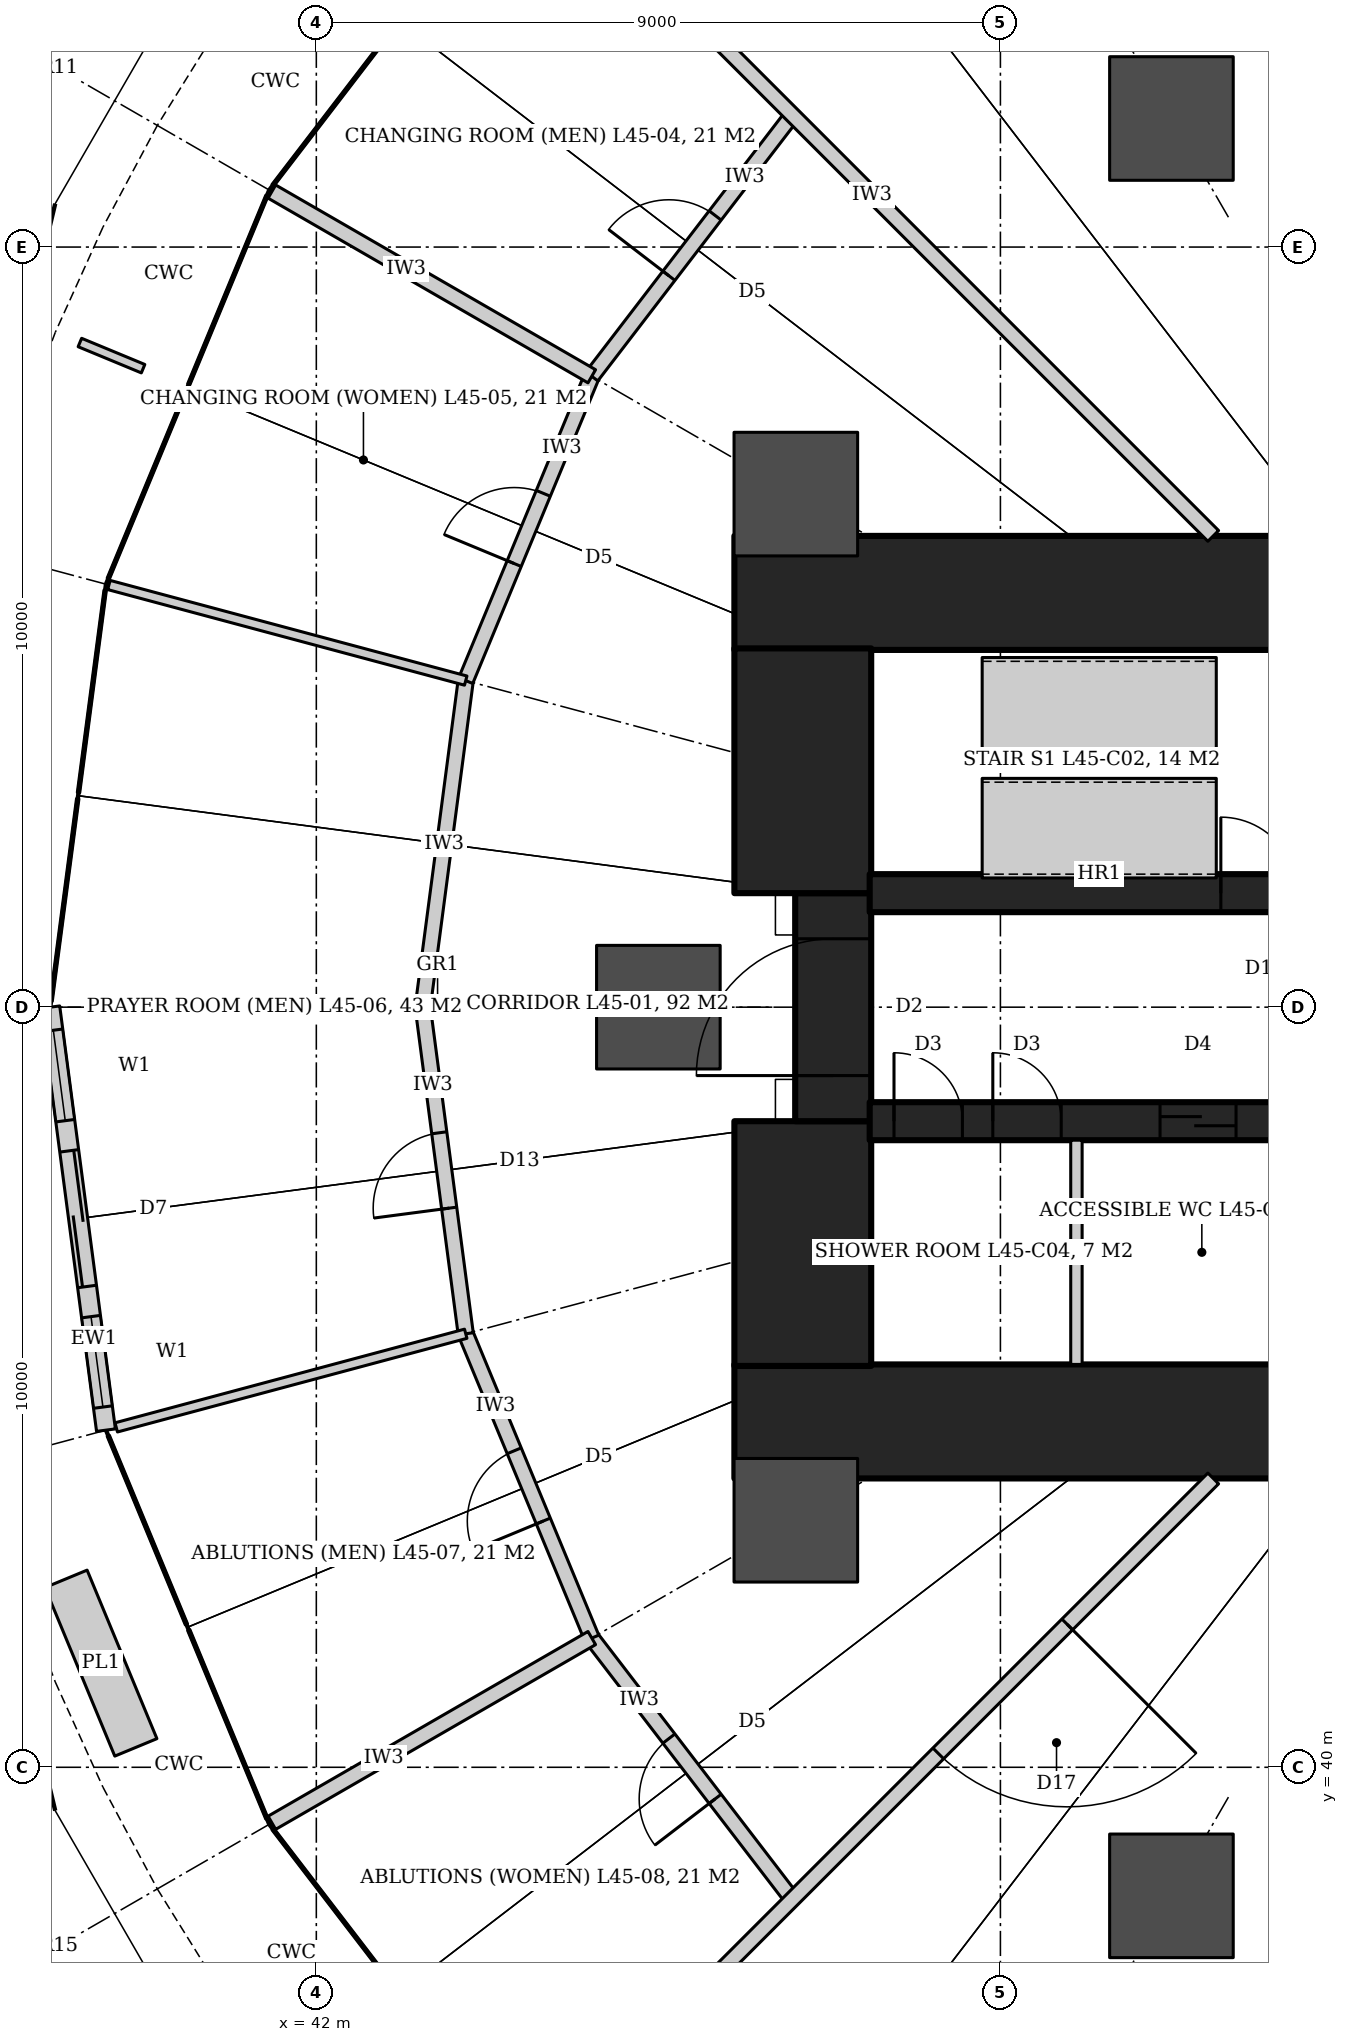
"""IFC4 building model, lengths in metres.
Left out: names, types, materials, properties, quantities, classifications, styles, units other than length and angle.
Written with IfcOpenShell. Run it as: python <this file> out.ifc"""

import sys

from ifc_helpers import new_model, si_unit, direction, frame, frame_2d, origin, origin_2d, place, context, subcontext, project, spatial, rectangle, hollow_circle, extrude, element, fill, save


model = new_model("IFC4")
c1 = context("Model", 3, precision=1e-05, world=origin(), true_north=direction((0.0, 1.0)))
c2 = subcontext(c1, "Body", "Model", "MODEL_VIEW")
j1 = project(units=[si_unit("LENGTHUNIT", "METRE"), si_unit("PLANEANGLEUNIT", "RADIAN")], contexts=[c1])
p1 = place(None, origin())
s1 = spatial("IfcSite", under=j1, at=p1, CompositionType="ELEMENT")
p2 = place(p1, origin())
s2 = spatial("IfcBuilding", under=s1, at=p2, CompositionType="ELEMENT")
p3 = place(p2, frame((0.0, 0.0, 198.2)))
s3 = spatial("IfcBuildingStorey", under=s2, at=p3, CompositionType="ELEMENT", Elevation=198.2)
for number, where, z_axis, x_axis in (
    (1, (47.5, 55.45, 0.0), (0.0, 0.0, 1.0), (1.0, 0.0, 0.0)),
    (2, (47.5, 44.55, 0.0), (0.0, 0.0, 1.0), (1.0, 0.0, 0.0)),
):
    element("IfcWall", number, at=place(p3, frame(where, z_axis=z_axis, x_axis=x_axis)), inside=s3, PredefinedType="SHEAR", context=c2, shape_type="SweptSolid", body=[
        extrude(rectangle(XDim=7.9, YDim=1.5, at=frame_2d((3.95, 0.0))), origin(), (0.0, 0.0, 1.0), 4.2),
    ])
p4 = place(p3, frame((48.4, 45.28, 0.0), z_axis=(0.0, 0.0, 1.0), x_axis=(0.0, 1.0, 0.0)))
e3 = element("IfcWall", 3, at=p4, inside=s3, PredefinedType="SHEAR", context=c2, shape_type="SweptSolid", body=[
    extrude(rectangle(XDim=3.22, YDim=1.8, at=frame_2d((1.61, 0.0))), origin(), (0.0, 0.0, 1.0), 4.2),
])
p5 = place(p3, frame((48.8, 48.5, 0.0), z_axis=(0.0, 0.0, 1.0), x_axis=(0.0, 1.0, 0.0)))
e4 = element("IfcWall", 4, at=p5, inside=s3, PredefinedType="SHEAR", context=c2, shape_type="SweptSolid", body=[
    extrude(rectangle(XDim=3.0, YDim=1.0, at=frame_2d((1.5, 0.0))), origin(), (0.0, 0.0, 1.0), 4.2),
])
p6 = place(p5, frame((0.6, 0.0, 0.0)))
e5 = element("IfcOpeningElement", 5, at=p6, cuts=e4, PredefinedType="OPENING", context=c2, shape_type="SweptSolid", body=[
    extrude(rectangle(XDim=1.8, YDim=2.1, at=frame_2d((0.9, 1.05))), frame((0.0, 0.51, 0.0), z_axis=(0.0, -1.0, 0.0), x_axis=(1.0, 0.0, 0.0)), (0.0, 0.0, 1.0), 1.02),
])
p7 = place(p3, frame((48.4, 51.5, 0.0), z_axis=(0.0, 0.0, 1.0), x_axis=(0.0, 1.0, 0.0)))
e6 = element("IfcWall", 6, at=p7, inside=s3, PredefinedType="SHEAR", context=c2, shape_type="SweptSolid", body=[
    extrude(rectangle(XDim=3.22, YDim=1.8, at=frame_2d((1.61, 0.0))), origin(), (0.0, 0.0, 1.0), 4.2),
])
p8 = place(p3, frame((49.28, 51.5, 0.0), z_axis=(0.0, 0.0, 1.0), x_axis=(1.0, 0.0, 0.0)))
e7 = element("IfcWall", 7, at=p8, inside=s3, PredefinedType="SHEAR", context=c2, shape_type="SweptSolid", body=[
    extrude(rectangle(XDim=6.12, YDim=0.5, at=frame_2d((3.06, 0.0))), origin(), (0.0, 0.0, 1.0), 4.2),
])
p9 = place(p8, frame((4.62, 0.0, 0.0)))
e8 = element("IfcOpeningElement", 8, at=p9, cuts=e7, PredefinedType="OPENING", context=c2, shape_type="SweptSolid", body=[
    extrude(rectangle(XDim=1.0, YDim=2.1, at=frame_2d((0.5, 1.05))), frame((0.0, 0.26, 0.0), z_axis=(0.0, -1.0, 0.0), x_axis=(1.0, 0.0, 0.0)), (0.0, 0.0, 1.0), 0.52),
])
p10 = place(p3, frame((49.28, 48.5, 0.0), z_axis=(0.0, 0.0, 1.0), x_axis=(1.0, 0.0, 0.0)))
e9 = element("IfcWall", 9, at=p10, inside=s3, PredefinedType="SHEAR", context=c2, shape_type="SweptSolid", body=[
    extrude(rectangle(XDim=6.12, YDim=0.5, at=frame_2d((3.06, 0.0))), origin(), (0.0, 0.0, 1.0), 4.2),
])
p11 = place(p10, frame((0.32, 0.0, 0.0)))
e10 = element("IfcOpeningElement", 10, at=p11, cuts=e9, PredefinedType="OPENING", context=c2, shape_type="SweptSolid", body=[
    extrude(rectangle(XDim=0.9, YDim=2.1, at=frame_2d((0.45, 1.05))), frame((0.0, 0.26, 0.0), z_axis=(0.0, -1.0, 0.0), x_axis=(1.0, 0.0, 0.0)), (0.0, 0.0, 1.0), 0.52),
])
p12 = place(p10, frame((1.62, 0.0, 0.0)))
e11 = element("IfcOpeningElement", 11, at=p12, cuts=e9, PredefinedType="OPENING", context=c2, shape_type="SweptSolid", body=[
    extrude(rectangle(XDim=0.9, YDim=2.1, at=frame_2d((0.45, 1.05))), frame((0.0, 0.26, 0.0), z_axis=(0.0, -1.0, 0.0), x_axis=(1.0, 0.0, 0.0)), (0.0, 0.0, 1.0), 0.52),
])
p13 = place(p10, frame((3.82, 0.0, 0.0)))
e12 = element("IfcOpeningElement", 12, at=p13, cuts=e9, PredefinedType="OPENING", context=c2, shape_type="SweptSolid", body=[
    extrude(rectangle(XDim=1.0, YDim=2.1, at=frame_2d((0.5, 1.05))), frame((0.0, 0.26, 0.0), z_axis=(0.0, -1.0, 0.0), x_axis=(1.0, 0.0, 0.0)), (0.0, 0.0, 1.0), 0.52),
])
for number, where, z_axis, x_axis in (
    (13, (53.25, 61.691, 0.0), (0.0, 0.0, 1.0), (1.0, 0.0, 0.0)),
    (14, (48.309, 56.75, 0.0), (0.0, 0.0, 1.0), (1.0, 0.0, 0.0)),
    (15, (46.5, 50.0, 0.0), (0.0, 0.0, 1.0), (1.0, 0.0, 0.0)),
    (16, (48.309, 43.25, 0.0), (0.0, 0.0, 1.0), (1.0, 0.0, 0.0)),
    (17, (53.25, 38.309, 0.0), (0.0, 0.0, 1.0), (1.0, 0.0, 0.0)),
):
    element("IfcColumn", number, at=place(p3, frame(where, z_axis=z_axis, x_axis=x_axis)), inside=s3, PredefinedType="COLUMN", context=c2, shape_type="SweptSolid", body=[
        extrude(hollow_circle(Radius=0.813, WallThickness=0.08, at=origin_2d()), origin(), (0.0, 0.0, 1.0), 4.2),
    ])
p14 = place(p3, frame((48.262, 38.262, 0.0), z_axis=(0.0, 0.0, 1.0), x_axis=(-0.60874374674, 0.79336690806, 0.0)))
e18 = element("IfcWall", 18, at=p14, inside=s3, PredefinedType="PARTITIONING", context=c2, shape_type="SweptSolid", body=[
    extrude(rectangle(XDim=4.333, YDim=0.2, at=frame_2d((2.167, 0.0))), origin(), (0.0, 0.0, 1.0), 3.012),
])
p15 = place(p14, frame((1.667, 0.0, 0.0)))
e19 = element("IfcOpeningElement", 19, at=p15, cuts=e18, PredefinedType="OPENING", context=c2, shape_type="SweptSolid", body=[
    extrude(rectangle(XDim=1.0, YDim=2.1, at=frame_2d((0.5, 1.05))), frame((0.0, 0.11, 0.0), z_axis=(0.0, -1.0, 0.0), x_axis=(1.0, 0.0, 0.0)), (0.0, 0.0, 1.0), 0.22),
])
p16 = place(p3, frame((45.624, 41.7, 0.0), z_axis=(0.0, 0.0, 1.0), x_axis=(-0.382698425325, 0.923873322082, 0.0)))
e20 = element("IfcWall", 20, at=p16, inside=s3, PredefinedType="PARTITIONING", context=c2, shape_type="SweptSolid", body=[
    extrude(rectangle(XDim=4.333, YDim=0.2, at=frame_2d((2.167, 0.0))), origin(), (0.0, 0.0, 1.0), 3.012),
])
p17 = place(p16, frame((1.667, 0.0, 0.0)))
e21 = element("IfcOpeningElement", 21, at=p17, cuts=e20, PredefinedType="OPENING", context=c2, shape_type="SweptSolid", body=[
    extrude(rectangle(XDim=1.0, YDim=2.1, at=frame_2d((0.5, 1.05))), frame((0.0, 0.11, 0.0), z_axis=(0.0, -1.0, 0.0), x_axis=(1.0, 0.0, 0.0)), (0.0, 0.0, 1.0), 0.22),
])
p18 = place(p3, frame((43.966, 45.704, 0.0), z_axis=(0.0, 0.0, 1.0), x_axis=(-0.130536124221, 0.99144355375, 0.0)))
e22 = element("IfcWall", 22, at=p18, inside=s3, PredefinedType="PARTITIONING", context=c2, shape_type="SweptSolid", body=[
    extrude(rectangle(XDim=4.333, YDim=0.2, at=frame_2d((2.167, 0.0))), origin(), (0.0, 0.0, 1.0), 3.012),
])
p19 = place(p18, frame((1.667, 0.0, 0.0)))
e23 = element("IfcOpeningElement", 23, at=p19, cuts=e22, PredefinedType="OPENING", context=c2, shape_type="SweptSolid", body=[
    extrude(rectangle(XDim=1.0, YDim=2.4, at=frame_2d((0.5, 1.2))), frame((0.0, 0.11, 0.0), z_axis=(0.0, -1.0, 0.0), x_axis=(1.0, 0.0, 0.0)), (0.0, 0.0, 1.0), 0.22),
])
p20 = place(p3, frame((43.4, 50.0, 0.0), z_axis=(0.0, 0.0, 1.0), x_axis=(0.130536124221, 0.99144355375, 0.0)))
e24 = element("IfcWall", 24, at=p20, inside=s3, PredefinedType="PARTITIONING", context=c2, shape_type="SweptSolid", body=[
    extrude(rectangle(XDim=4.333, YDim=0.2, at=frame_2d((2.167, 0.0))), origin(), (0.0, 0.0, 1.0), 3.012),
])
p21 = place(p3, frame((43.966, 54.296, 0.0), z_axis=(0.0, 0.0, 1.0), x_axis=(0.382698425325, 0.923873322082, 0.0)))
e25 = element("IfcWall", 25, at=p21, inside=s3, PredefinedType="PARTITIONING", context=c2, shape_type="SweptSolid", body=[
    extrude(rectangle(XDim=4.333, YDim=0.2, at=frame_2d((2.167, 0.0))), origin(), (0.0, 0.0, 1.0), 3.012),
])
p22 = place(p21, frame((1.667, 0.0, 0.0)))
e26 = element("IfcOpeningElement", 26, at=p22, cuts=e25, PredefinedType="OPENING", context=c2, shape_type="SweptSolid", body=[
    extrude(rectangle(XDim=1.0, YDim=2.1, at=frame_2d((0.5, 1.05))), frame((0.0, 0.11, 0.0), z_axis=(0.0, -1.0, 0.0), x_axis=(1.0, 0.0, 0.0)), (0.0, 0.0, 1.0), 0.22),
])
p23 = place(p3, frame((45.624, 58.3, 0.0), z_axis=(0.0, 0.0, 1.0), x_axis=(0.60874374674, 0.79336690806, 0.0)))
e27 = element("IfcWall", 27, at=p23, inside=s3, PredefinedType="PARTITIONING", context=c2, shape_type="SweptSolid", body=[
    extrude(rectangle(XDim=4.333, YDim=0.2, at=frame_2d((2.167, 0.0))), origin(), (0.0, 0.0, 1.0), 3.012),
])
p24 = place(p23, frame((1.667, 0.0, 0.0)))
e28 = element("IfcOpeningElement", 28, at=p24, cuts=e27, PredefinedType="OPENING", context=c2, shape_type="SweptSolid", body=[
    extrude(rectangle(XDim=1.0, YDim=2.1, at=frame_2d((0.5, 1.05))), frame((0.0, 0.11, 0.0), z_axis=(0.0, -1.0, 0.0), x_axis=(1.0, 0.0, 0.0)), (0.0, 0.0, 1.0), 0.22),
])
p25 = place(p3, frame((53.8, 56.2, 0.0), z_axis=(0.0, 0.0, 1.0), x_axis=(-0.707106781187, 0.707106781187, 0.0)))
e29 = element("IfcWall", 29, at=p25, inside=s3, PredefinedType="PARTITIONING", context=c2, shape_type="SweptSolid", body=[
    extrude(rectangle(XDim=12.692, YDim=0.2, at=frame_2d((6.346, 0.0))), origin(), (0.0, 0.0, 1.0), 3.02),
])
p26 = place(p3, frame((45.624, 58.3, 0.0), z_axis=(0.0, 0.0, 1.0), x_axis=(-0.866036685051, 0.499980459763, 0.0)))
e30 = element("IfcWall", 30, at=p26, inside=s3, PredefinedType="PARTITIONING", context=c2, shape_type="SweptSolid", body=[
    extrude(rectangle(XDim=4.86, YDim=0.2, at=frame_2d((2.43, 0.0))), origin(), (0.0, 0.0, 1.0), 3.04),
])
p27 = place(p3, frame((43.966, 54.296, 0.0), z_axis=(0.0, 0.0, 1.0), x_axis=(-0.965927422152, 0.258813089189, 0.0)))
e31 = element("IfcWall", 31, at=p27, inside=s3, PredefinedType="PARTITIONING", context=c2, shape_type="SweptSolid", body=[
    extrude(rectangle(XDim=4.86, YDim=0.125, at=frame_2d((2.43, 0.0))), origin(), (0.0, 0.0, 1.0), 3.04),
])
p28 = place(p3, frame((43.966, 45.704, 0.0), z_axis=(0.0, 0.0, 1.0), x_axis=(-0.965926072385, -0.25881812666, 0.0)))
e32 = element("IfcWall", 32, at=p28, inside=s3, PredefinedType="PARTITIONING", context=c2, shape_type="SweptSolid", body=[
    extrude(rectangle(XDim=4.76, YDim=0.125, at=frame_2d((2.38, 0.0))), origin(), (0.0, 0.0, 1.0), 3.04),
])
p29 = place(p3, frame((45.624, 41.7, 0.0), z_axis=(0.0, 0.0, 1.0), x_axis=(-0.866036685051, -0.499980459763, 0.0)))
e33 = element("IfcWall", 33, at=p29, inside=s3, PredefinedType="PARTITIONING", context=c2, shape_type="SweptSolid", body=[
    extrude(rectangle(XDim=4.86, YDim=0.2, at=frame_2d((2.43, 0.0))), origin(), (0.0, 0.0, 1.0), 3.04),
])
p30 = place(p3, frame((53.8, 43.8, 0.0), z_axis=(0.0, 0.0, 1.0), x_axis=(-0.707106781187, -0.707106781187, 0.0)))
e34 = element("IfcWall", 34, at=p30, inside=s3, PredefinedType="PARTITIONING", context=c2, shape_type="SweptSolid", body=[
    extrude(rectangle(XDim=12.692, YDim=0.2, at=frame_2d((6.346, 0.0))), origin(), (0.0, 0.0, 1.0), 3.02),
])
p31 = place(p30, frame((2.716, 0.0, 0.0)))
e35 = element("IfcOpeningElement", 35, at=p31, cuts=e34, PredefinedType="OPENING", context=c2, shape_type="SweptSolid", body=[
    extrude(rectangle(XDim=2.4, YDim=2.4, at=frame_2d((1.2, 1.2))), frame((0.0, 0.11, 0.0), z_axis=(0.0, -1.0, 0.0), x_axis=(1.0, 0.0, 0.0)), (0.0, 0.0, 1.0), 0.22),
])
p32 = place(p3, frame((38.5, 50.0, 0.0), z_axis=(0.0, 0.0, 1.0), x_axis=(0.130536651449, -0.991443484334, 0.0)))
e36 = element("IfcWall", 36, at=p32, inside=s3, PredefinedType="SOLIDWALL", context=c2, shape_type="SweptSolid", body=[
    extrude(rectangle(XDim=5.613, YDim=0.25, at=frame_2d((2.806, 0.0))), origin(), (0.0, 0.0, 1.0), 4.04),
])
p33 = place(p32, frame((1.906, 0.0, 0.0)))
e37 = element("IfcOpeningElement", 37, at=p33, cuts=e36, PredefinedType="OPENING", context=c2, shape_type="SweptSolid", body=[
    extrude(rectangle(XDim=1.8, YDim=2.4, at=frame_2d((0.9, 1.2))), frame((0.0, 0.135, 0.0), z_axis=(0.0, -1.0, 0.0), x_axis=(1.0, 0.0, 0.0)), (0.0, 0.0, 1.0), 0.27),
])
p34 = place(p32, frame((0.306, 0.0, 0.0)))
e38 = element("IfcOpeningElement", 38, at=p34, cuts=e36, PredefinedType="OPENING", context=c2, shape_type="SweptSolid", body=[
    extrude(rectangle(XDim=1.2, YDim=2.4, at=frame_2d((0.6, 1.2))), frame((0.0, 0.135, 0.0), z_axis=(0.0, -1.0, 0.0), x_axis=(1.0, 0.0, 0.0)), (0.0, 0.0, 1.0), 0.27),
])
p35 = place(p32, frame((4.106, 0.0, 0.0)))
e39 = element("IfcOpeningElement", 39, at=p35, cuts=e36, PredefinedType="OPENING", context=c2, shape_type="SweptSolid", body=[
    extrude(rectangle(XDim=1.2, YDim=2.4, at=frame_2d((0.6, 1.2))), frame((0.0, 0.135, 0.0), z_axis=(0.0, -1.0, 0.0), x_axis=(1.0, 0.0, 0.0)), (0.0, 0.0, 1.0), 0.27),
])
p36 = place(p3, frame((52.0, 45.3, 0.0), z_axis=(0.0, 0.0, 1.0), x_axis=(0.0, 1.0, 0.0)))
e40 = element("IfcWall", 40, at=p36, inside=s3, PredefinedType="PARTITIONING", context=c2, shape_type="SweptSolid", body=[
    extrude(rectangle(XDim=2.95, YDim=0.15, at=frame_2d((1.475, 0.0))), origin(), (0.0, 0.0, 1.0), 4.04),
])
p37 = place(p24, origin())
e41 = element("IfcDoor", 41, at=p37, inside=s3, OperationType="SINGLE_SWING_LEFT", PredefinedType="DOOR", context=c2, shape_type="SweptSolid", body=[
    extrude(rectangle(XDim=1.0, YDim=2.1, at=frame_2d((0.5, 1.05))), frame((0.0, 0.025, 0.0), z_axis=(0.0, -1.0, 0.0), x_axis=(1.0, 0.0, 0.0)), (0.0, 0.0, 1.0), 0.05),
])
fill(e28, e41)
p38 = place(p22, origin())
e42 = element("IfcDoor", 42, at=p38, inside=s3, OperationType="SINGLE_SWING_LEFT", PredefinedType="DOOR", context=c2, shape_type="SweptSolid", body=[
    extrude(rectangle(XDim=1.0, YDim=2.1, at=frame_2d((0.5, 1.05))), frame((0.0, 0.025, 0.0), z_axis=(0.0, -1.0, 0.0), x_axis=(1.0, 0.0, 0.0)), (0.0, 0.0, 1.0), 0.05),
])
fill(e26, e42)
p39 = place(p19, origin())
e43 = element("IfcDoor", 43, at=p39, inside=s3, OperationType="SINGLE_SWING_LEFT", PredefinedType="DOOR", context=c2, shape_type="SweptSolid", body=[
    extrude(rectangle(XDim=1.0, YDim=2.4, at=frame_2d((0.5, 1.2))), frame((0.0, 0.025, 0.0), z_axis=(0.0, -1.0, 0.0), x_axis=(1.0, 0.0, 0.0)), (0.0, 0.0, 1.0), 0.05),
])
fill(e23, e43)
p40 = place(p17, origin())
e44 = element("IfcDoor", 44, at=p40, inside=s3, OperationType="SINGLE_SWING_LEFT", PredefinedType="DOOR", context=c2, shape_type="SweptSolid", body=[
    extrude(rectangle(XDim=1.0, YDim=2.1, at=frame_2d((0.5, 1.05))), frame((0.0, 0.025, 0.0), z_axis=(0.0, -1.0, 0.0), x_axis=(1.0, 0.0, 0.0)), (0.0, 0.0, 1.0), 0.05),
])
fill(e21, e44)
p41 = place(p15, origin())
e45 = element("IfcDoor", 45, at=p41, inside=s3, OperationType="SINGLE_SWING_LEFT", PredefinedType="DOOR", context=c2, shape_type="SweptSolid", body=[
    extrude(rectangle(XDim=1.0, YDim=2.1, at=frame_2d((0.5, 1.05))), frame((0.0, 0.025, 0.0), z_axis=(0.0, -1.0, 0.0), x_axis=(1.0, 0.0, 0.0)), (0.0, 0.0, 1.0), 0.05),
])
fill(e19, e45)
p42 = place(p31, origin())
e46 = element("IfcDoor", 46, at=p42, inside=s3, OperationType="DOUBLE_DOOR_DOUBLE_SWING", PredefinedType="DOOR", context=c2, shape_type="SweptSolid", body=[
    extrude(rectangle(XDim=2.4, YDim=2.4, at=frame_2d((1.2, 1.2))), frame((0.0, 0.025, 0.0), z_axis=(0.0, -1.0, 0.0), x_axis=(1.0, 0.0, 0.0)), (0.0, 0.0, 1.0), 0.05),
])
fill(e35, e46)
p43 = place(p33, origin())
e47 = element("IfcDoor", 47, at=p43, inside=s3, OperationType="DOUBLE_DOOR_SLIDING", PredefinedType="DOOR", context=c2, shape_type="SweptSolid", body=[
    extrude(rectangle(XDim=1.8, YDim=2.4, at=frame_2d((0.9, 1.2))), frame((0.0, 0.025, 0.0), z_axis=(0.0, -1.0, 0.0), x_axis=(1.0, 0.0, 0.0)), (0.0, 0.0, 1.0), 0.05),
])
fill(e37, e47)
p44 = place(p34, origin())
e48 = element("IfcWindow", 48, at=p44, inside=s3, PartitioningType="SINGLE_PANEL", PredefinedType="WINDOW", context=c2, shape_type="SweptSolid", body=[
    extrude(rectangle(XDim=1.2, YDim=2.4, at=frame_2d((0.6, 1.2))), frame((0.0, 0.03, 0.0), z_axis=(0.0, -1.0, 0.0), x_axis=(1.0, 0.0, 0.0)), (0.0, 0.0, 1.0), 0.06),
])
fill(e38, e48)
p45 = place(p35, origin())
e49 = element("IfcWindow", 49, at=p45, inside=s3, PartitioningType="SINGLE_PANEL", PredefinedType="WINDOW", context=c2, shape_type="SweptSolid", body=[
    extrude(rectangle(XDim=1.2, YDim=2.4, at=frame_2d((0.6, 1.2))), frame((0.0, 0.03, 0.0), z_axis=(0.0, -1.0, 0.0), x_axis=(1.0, 0.0, 0.0)), (0.0, 0.0, 1.0), 0.06),
])
fill(e39, e49)
p46 = place(p9, origin())
e50 = element("IfcDoor", 50, at=p46, inside=s3, OperationType="SINGLE_SWING_LEFT", PredefinedType="DOOR", context=c2, shape_type="SweptSolid", body=[
    extrude(rectangle(XDim=1.0, YDim=2.1, at=frame_2d((0.5, 1.05))), frame((0.0, 0.025, 0.0), z_axis=(0.0, -1.0, 0.0), x_axis=(1.0, 0.0, 0.0)), (0.0, 0.0, 1.0), 0.05),
])
fill(e8, e50)
p47 = place(p11, origin())
e51 = element("IfcDoor", 51, at=p47, inside=s3, OperationType="SINGLE_SWING_RIGHT", PredefinedType="DOOR", context=c2, shape_type="SweptSolid", body=[
    extrude(rectangle(XDim=0.9, YDim=2.1, at=frame_2d((0.45, 1.05))), frame((0.0, 0.025, 0.0), z_axis=(0.0, -1.0, 0.0), x_axis=(1.0, 0.0, 0.0)), (0.0, 0.0, 1.0), 0.05),
])
fill(e10, e51)
p48 = place(p12, origin())
e52 = element("IfcDoor", 52, at=p48, inside=s3, OperationType="SINGLE_SWING_RIGHT", PredefinedType="DOOR", context=c2, shape_type="SweptSolid", body=[
    extrude(rectangle(XDim=0.9, YDim=2.1, at=frame_2d((0.45, 1.05))), frame((0.0, 0.025, 0.0), z_axis=(0.0, -1.0, 0.0), x_axis=(1.0, 0.0, 0.0)), (0.0, 0.0, 1.0), 0.05),
])
fill(e11, e52)
p49 = place(p13, origin())
e53 = element("IfcDoor", 53, at=p49, inside=s3, OperationType="SLIDING_TO_LEFT", PredefinedType="DOOR", context=c2, shape_type="SweptSolid", body=[
    extrude(rectangle(XDim=1.0, YDim=2.1, at=frame_2d((0.5, 1.05))), frame((0.0, 0.025, 0.0), z_axis=(0.0, -1.0, 0.0), x_axis=(1.0, 0.0, 0.0)), (0.0, 0.0, 1.0), 0.05),
])
fill(e12, e53)
p50 = place(p6, origin())
e54 = element("IfcDoor", 54, at=p50, inside=s3, OperationType="DOUBLE_DOOR_DOUBLE_SWING", PredefinedType="DOOR", context=c2, shape_type="SweptSolid", body=[
    extrude(rectangle(XDim=1.8, YDim=2.1, at=frame_2d((0.9, 1.05))), frame((0.0, 0.025, 0.0), z_axis=(0.0, -1.0, 0.0), x_axis=(1.0, 0.0, 0.0)), (0.0, 0.0, 1.0), 0.05),
])
fill(e5, e54)
save(model, sys.argv[1])
